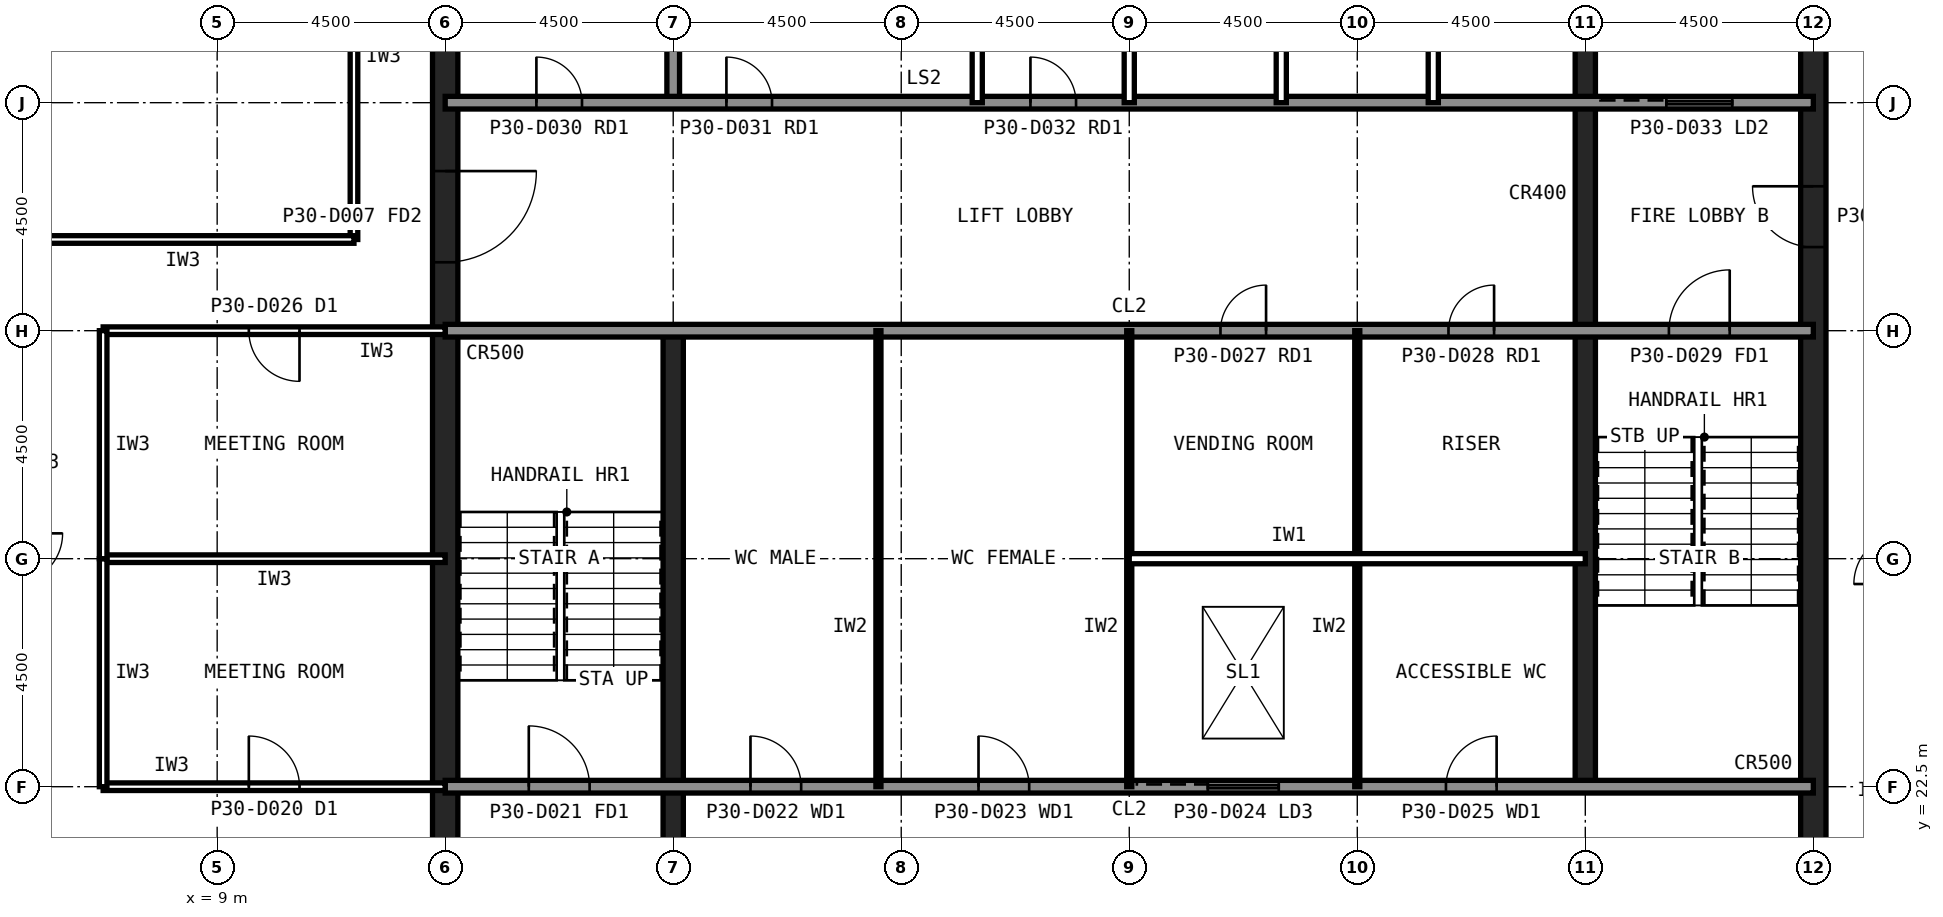
"""IFC4 building model, lengths in metres.
Left out: names, types, materials, properties, quantities, classifications, styles, units other than length and angle.
Written with IfcOpenShell. Run it as: python <this file> out.ifc"""

import sys

from ifc_helpers import new_model, si_unit, direction, frame, frame_2d, origin, place, context, subcontext, project, spatial, rectangle, extrude, element, fill, save


model = new_model("IFC4")
c1 = context("Model", 3, precision=1e-05, world=origin(), true_north=direction((0.0, 1.0)))
c2 = subcontext(c1, "Body", "Model", "MODEL_VIEW")
j1 = project(units=[si_unit("LENGTHUNIT", "METRE"), si_unit("PLANEANGLEUNIT", "RADIAN")], contexts=[c1])
p1 = place(None, origin())
s1 = spatial("IfcSite", under=j1, at=p1, CompositionType="ELEMENT")
p2 = place(p1, origin())
s2 = spatial("IfcBuilding", under=s1, at=p2, CompositionType="ELEMENT")
p3 = place(p2, frame((0.0, 0.0, 127.6)))
s3 = spatial("IfcBuildingStorey", under=s2, at=p3, CompositionType="ELEMENT", Elevation=127.6)
p4 = place(p3, frame((40.5, 13.5, 0.0), z_axis=(0.0, 0.0, 1.0), x_axis=(0.0, 1.0, 0.0)))
e1 = element("IfcWall", 1, at=p4, inside=s3, PredefinedType="SHEAR", context=c2, shape_type="SweptSolid", body=[
    extrude(rectangle(XDim=27.0, YDim=0.5, at=frame_2d((13.5, 0.0))), origin(), (0.0, 0.0, 1.0), 4.0),
])
p5 = place(p4, frame((5.85, 0.0, 0.0)))
e2 = element("IfcOpeningElement", 2, at=p5, cuts=e1, PredefinedType="OPENING", context=c2, shape_type="SweptSolid", body=[
    extrude(rectangle(XDim=1.8, YDim=2.1, at=frame_2d((0.9, 1.05))), frame((0.0, 0.26, 0.0), z_axis=(0.0, -1.0, 0.0), x_axis=(1.0, 0.0, 0.0)), (0.0, 0.0, 1.0), 0.52),
])
p6 = place(p4, frame((19.65, 0.0, 0.0)))
e3 = element("IfcOpeningElement", 3, at=p6, cuts=e1, PredefinedType="OPENING", context=c2, shape_type="SweptSolid", body=[
    extrude(rectangle(XDim=1.2, YDim=2.1, at=frame_2d((0.6, 1.05))), frame((0.0, 0.26, 0.0), z_axis=(0.0, -1.0, 0.0), x_axis=(1.0, 0.0, 0.0)), (0.0, 0.0, 1.0), 0.52),
])
p7 = place(p3, frame((13.5, 40.5, 0.0), z_axis=(0.0, 0.0, 1.0), x_axis=(0.0, -1.0, 0.0)))
e4 = element("IfcWall", 4, at=p7, inside=s3, PredefinedType="SHEAR", context=c2, shape_type="SweptSolid", body=[
    extrude(rectangle(XDim=27.0, YDim=0.5, at=frame_2d((13.5, 0.0))), origin(), (0.0, 0.0, 1.0), 4.0),
])
p8 = place(p7, frame((19.65, 0.0, 0.0)))
e5 = element("IfcOpeningElement", 5, at=p8, cuts=e4, PredefinedType="OPENING", context=c2, shape_type="SweptSolid", body=[
    extrude(rectangle(XDim=1.2, YDim=2.1, at=frame_2d((0.6, 1.05))), frame((0.0, 0.26, 0.0), z_axis=(0.0, -1.0, 0.0), x_axis=(1.0, 0.0, 0.0)), (0.0, 0.0, 1.0), 0.52),
])
p9 = place(p7, frame((5.85, 0.0, 0.0)))
e6 = element("IfcOpeningElement", 6, at=p9, cuts=e4, PredefinedType="OPENING", context=c2, shape_type="SweptSolid", body=[
    extrude(rectangle(XDim=1.8, YDim=2.1, at=frame_2d((0.9, 1.05))), frame((0.0, 0.26, 0.0), z_axis=(0.0, -1.0, 0.0), x_axis=(1.0, 0.0, 0.0)), (0.0, 0.0, 1.0), 0.52),
])
p10 = place(p3, frame((18.0, 13.5, 0.0), z_axis=(0.0, 0.0, 1.0), x_axis=(0.0, 1.0, 0.0)))
e7 = element("IfcWall", 7, at=p10, inside=s3, PredefinedType="SHEAR", context=c2, shape_type="SweptSolid", body=[
    extrude(rectangle(XDim=18.0, YDim=0.4, at=frame_2d((9.0, 0.0))), origin(), (0.0, 0.0, 1.0), 4.0),
])
p11 = place(p3, frame((18.0, 36.0, 0.0), z_axis=(0.0, 0.0, 1.0), x_axis=(0.0, 1.0, 0.0)))
e8 = element("IfcWall", 8, at=p11, inside=s3, PredefinedType="SOLIDWALL", context=c2, shape_type="SweptSolid", body=[
    extrude(rectangle(XDim=4.5, YDim=0.25, at=frame_2d((2.25, 0.0))), origin(), (0.0, 0.0, 1.0), 3.84),
])
p12 = place(p3, frame((36.0, 22.5, 0.0), z_axis=(0.0, 0.0, 1.0), x_axis=(0.0, 1.0, 0.0)))
e9 = element("IfcWall", 9, at=p12, inside=s3, PredefinedType="SHEAR", context=c2, shape_type="SweptSolid", body=[
    extrude(rectangle(XDim=18.0, YDim=0.4, at=frame_2d((9.0, 0.0))), origin(), (0.0, 0.0, 1.0), 4.0),
])
p13 = place(p3, frame((13.5, 36.0, 0.0), z_axis=(0.0, 0.0, 1.0), x_axis=(1.0, 0.0, 0.0)))
e10 = element("IfcWall", 10, at=p13, inside=s3, PredefinedType="SOLIDWALL", context=c2, shape_type="SweptSolid", body=[
    extrude(rectangle(XDim=27.0, YDim=0.25, at=frame_2d((13.5, 0.0))), origin(), (0.0, 0.0, 1.0), 3.84),
])
p14 = place(p13, frame((1.8, 0.0, 0.0)))
e11 = element("IfcOpeningElement", 11, at=p14, cuts=e10, PredefinedType="OPENING", context=c2, shape_type="SweptSolid", body=[
    extrude(rectangle(XDim=0.9, YDim=2.1, at=frame_2d((0.45, 1.05))), frame((0.0, 0.135, 0.0), z_axis=(0.0, -1.0, 0.0), x_axis=(1.0, 0.0, 0.0)), (0.0, 0.0, 1.0), 0.27),
])
p15 = place(p13, frame((5.55, 0.0, 0.0)))
e12 = element("IfcOpeningElement", 12, at=p15, cuts=e10, PredefinedType="OPENING", context=c2, shape_type="SweptSolid", body=[
    extrude(rectangle(XDim=0.9, YDim=2.1, at=frame_2d((0.45, 1.05))), frame((0.0, 0.135, 0.0), z_axis=(0.0, -1.0, 0.0), x_axis=(1.0, 0.0, 0.0)), (0.0, 0.0, 1.0), 0.27),
])
p16 = place(p13, frame((8.55, 0.0, 0.0)))
e13 = element("IfcOpeningElement", 13, at=p16, cuts=e10, PredefinedType="OPENING", context=c2, shape_type="SweptSolid", body=[
    extrude(rectangle(XDim=0.9, YDim=2.1, at=frame_2d((0.45, 1.05))), frame((0.0, 0.135, 0.0), z_axis=(0.0, -1.0, 0.0), x_axis=(1.0, 0.0, 0.0)), (0.0, 0.0, 1.0), 0.27),
])
p17 = place(p13, frame((11.55, 0.0, 0.0)))
e14 = element("IfcOpeningElement", 14, at=p17, cuts=e10, PredefinedType="OPENING", context=c2, shape_type="SweptSolid", body=[
    extrude(rectangle(XDim=0.9, YDim=2.1, at=frame_2d((0.45, 1.05))), frame((0.0, 0.135, 0.0), z_axis=(0.0, -1.0, 0.0), x_axis=(1.0, 0.0, 0.0)), (0.0, 0.0, 1.0), 0.27),
])
p18 = place(p13, frame((24.1, 0.0, 0.0)))
e15 = element("IfcOpeningElement", 15, at=p18, cuts=e10, PredefinedType="OPENING", context=c2, shape_type="SweptSolid", body=[
    extrude(rectangle(XDim=1.3, YDim=2.2, at=frame_2d((0.65, 1.1))), frame((0.0, 0.135, 0.0), z_axis=(0.0, -1.0, 0.0), x_axis=(1.0, 0.0, 0.0)), (0.0, 0.0, 1.0), 0.27),
])
p19 = place(p3, frame((13.5, 22.5, 0.0), z_axis=(0.0, 0.0, 1.0), x_axis=(1.0, 0.0, 0.0)))
e16 = element("IfcWall", 16, at=p19, inside=s3, PredefinedType="SOLIDWALL", context=c2, shape_type="SweptSolid", body=[
    extrude(rectangle(XDim=27.0, YDim=0.25, at=frame_2d((13.5, 0.0))), origin(), (0.0, 0.0, 1.0), 3.84),
])
p20 = place(p19, frame((1.65, 0.0, 0.0)))
e17 = element("IfcOpeningElement", 17, at=p20, cuts=e16, PredefinedType="OPENING", context=c2, shape_type="SweptSolid", body=[
    extrude(rectangle(XDim=1.2, YDim=2.1, at=frame_2d((0.6, 1.05))), frame((0.0, 0.135, 0.0), z_axis=(0.0, -1.0, 0.0), x_axis=(1.0, 0.0, 0.0)), (0.0, 0.0, 1.0), 0.27),
])
p21 = place(p19, frame((6.025, 0.0, 0.0)))
e18 = element("IfcOpeningElement", 18, at=p21, cuts=e16, PredefinedType="OPENING", context=c2, shape_type="SweptSolid", body=[
    extrude(rectangle(XDim=1.0, YDim=2.1, at=frame_2d((0.5, 1.05))), frame((0.0, 0.135, 0.0), z_axis=(0.0, -1.0, 0.0), x_axis=(1.0, 0.0, 0.0)), (0.0, 0.0, 1.0), 0.27),
])
p22 = place(p19, frame((10.525, 0.0, 0.0)))
e19 = element("IfcOpeningElement", 19, at=p22, cuts=e16, PredefinedType="OPENING", context=c2, shape_type="SweptSolid", body=[
    extrude(rectangle(XDim=1.0, YDim=2.1, at=frame_2d((0.5, 1.05))), frame((0.0, 0.135, 0.0), z_axis=(0.0, -1.0, 0.0), x_axis=(1.0, 0.0, 0.0)), (0.0, 0.0, 1.0), 0.27),
])
p23 = place(p19, frame((19.75, 0.0, 0.0)))
e20 = element("IfcOpeningElement", 20, at=p23, cuts=e16, PredefinedType="OPENING", context=c2, shape_type="SweptSolid", body=[
    extrude(rectangle(XDim=1.0, YDim=2.1, at=frame_2d((0.5, 1.05))), frame((0.0, 0.135, 0.0), z_axis=(0.0, -1.0, 0.0), x_axis=(1.0, 0.0, 0.0)), (0.0, 0.0, 1.0), 0.27),
])
p24 = place(p19, frame((15.05, 0.0, 0.0)))
e21 = element("IfcOpeningElement", 21, at=p24, cuts=e16, PredefinedType="OPENING", context=c2, shape_type="SweptSolid", body=[
    extrude(rectangle(XDim=1.4, YDim=2.4, at=frame_2d((0.7, 1.2))), frame((0.0, 0.135, 0.0), z_axis=(0.0, -1.0, 0.0), x_axis=(1.0, 0.0, 0.0)), (0.0, 0.0, 1.0), 0.27),
])
p25 = place(p3, frame((13.5, 31.5, 0.0), z_axis=(0.0, 0.0, 1.0), x_axis=(1.0, 0.0, 0.0)))
e22 = element("IfcWall", 22, at=p25, inside=s3, PredefinedType="SOLIDWALL", context=c2, shape_type="SweptSolid", body=[
    extrude(rectangle(XDim=27.0, YDim=0.25, at=frame_2d((13.5, 0.0))), origin(), (0.0, 0.0, 1.0), 3.84),
])
p26 = place(p25, frame((24.15, 0.0, 0.0)))
e23 = element("IfcOpeningElement", 23, at=p26, cuts=e22, PredefinedType="OPENING", context=c2, shape_type="SweptSolid", body=[
    extrude(rectangle(XDim=1.2, YDim=2.1, at=frame_2d((0.6, 1.05))), frame((0.0, 0.135, 0.0), z_axis=(0.0, -1.0, 0.0), x_axis=(1.0, 0.0, 0.0)), (0.0, 0.0, 1.0), 0.27),
])
p27 = place(p25, frame((15.3, 0.0, 0.0)))
e24 = element("IfcOpeningElement", 24, at=p27, cuts=e22, PredefinedType="OPENING", context=c2, shape_type="SweptSolid", body=[
    extrude(rectangle(XDim=0.9, YDim=2.1, at=frame_2d((0.45, 1.05))), frame((0.0, 0.135, 0.0), z_axis=(0.0, -1.0, 0.0), x_axis=(1.0, 0.0, 0.0)), (0.0, 0.0, 1.0), 0.27),
])
p28 = place(p25, frame((19.8, 0.0, 0.0)))
e25 = element("IfcOpeningElement", 25, at=p28, cuts=e22, PredefinedType="OPENING", context=c2, shape_type="SweptSolid", body=[
    extrude(rectangle(XDim=0.9, YDim=2.1, at=frame_2d((0.45, 1.05))), frame((0.0, 0.135, 0.0), z_axis=(0.0, -1.0, 0.0), x_axis=(1.0, 0.0, 0.0)), (0.0, 0.0, 1.0), 0.27),
])
for number, where, z_axis, x_axis in (
    (26, (21.0, 36.0, 0.0), (0.0, 0.0, 1.0), (0.0, 1.0, 0.0)),
    (27, (24.0, 36.0, 0.0), (0.0, 0.0, 1.0), (0.0, 1.0, 0.0)),
    (28, (27.0, 36.0, 0.0), (0.0, 0.0, 1.0), (0.0, 1.0, 0.0)),
    (29, (30.0, 36.0, 0.0), (0.0, 0.0, 1.0), (0.0, 1.0, 0.0)),
    (30, (33.0, 36.0, 0.0), (0.0, 0.0, 1.0), (0.0, 1.0, 0.0)),
):
    element("IfcWall", number, at=place(p3, frame(where, z_axis=z_axis, x_axis=x_axis)), inside=s3, PredefinedType="PARTITIONING", context=c2, shape_type="SweptSolid", body=[
        extrude(rectangle(XDim=4.5, YDim=0.2, at=frame_2d((2.25, 0.0))), origin(), (0.0, 0.0, 1.0), 3.84),
    ])
for number, where, z_axis, x_axis in (
    (31, (22.05, 22.5, 0.0), (0.0, 0.0, 1.0), (0.0, 1.0, 0.0)),
    (32, (27.0, 22.5, 0.0), (0.0, 0.0, 1.0), (0.0, 1.0, 0.0)),
    (33, (31.5, 22.5, 0.0), (0.0, 0.0, 1.0), (0.0, 1.0, 0.0)),
):
    element("IfcWall", number, at=place(p3, frame(where, z_axis=z_axis, x_axis=x_axis)), inside=s3, PredefinedType="PLUMBINGWALL", context=c2, shape_type="SweptSolid", body=[
        extrude(rectangle(XDim=9.0, YDim=0.1, at=frame_2d((4.5, 0.0))), origin(), (0.0, 0.0, 1.0), 3.84),
    ])
p29 = place(p3, frame((27.0, 27.0, 0.0), z_axis=(0.0, 0.0, 1.0), x_axis=(1.0, 0.0, 0.0)))
e34 = element("IfcWall", 34, at=p29, inside=s3, PredefinedType="PARTITIONING", context=c2, shape_type="SweptSolid", body=[
    extrude(rectangle(XDim=9.0, YDim=0.2, at=frame_2d((4.5, 0.0))), origin(), (0.0, 0.0, 1.0), 3.84),
])
p30 = place(p3, frame((11.7, 40.5, 0.0), z_axis=(0.0, 0.0, 1.0), x_axis=(0.0, -1.0, 0.0)))
e35 = element("IfcWall", 35, at=p30, inside=s3, PredefinedType="PARTITIONING", context=c2, shape_type="SweptSolid", body=[
    extrude(rectangle(XDim=7.2, YDim=0.15, at=frame_2d((3.6, 0.0))), origin(), (0.0, 0.0, 1.0), 3.84),
])
p31 = place(p3, frame((11.7, 33.3, 0.0), z_axis=(0.0, 0.0, 1.0), x_axis=(-1.0, 0.0, 0.0)))
e36 = element("IfcWall", 36, at=p31, inside=s3, PredefinedType="PARTITIONING", context=c2, shape_type="SweptSolid", body=[
    extrude(rectangle(XDim=6.75, YDim=0.15, at=frame_2d((3.375, 0.0))), origin(), (0.0, 0.0, 1.0), 3.84),
])
p32 = place(p3, frame((6.75, 22.5, 0.0), z_axis=(0.0, 0.0, 1.0), x_axis=(1.0, 0.0, 0.0)))
e37 = element("IfcWall", 37, at=p32, inside=s3, PredefinedType="PARTITIONING", context=c2, shape_type="SweptSolid", body=[
    extrude(rectangle(XDim=6.75, YDim=0.15, at=frame_2d((3.375, 0.0))), origin(), (0.0, 0.0, 1.0), 2.989),
])
p33 = place(p32, frame((2.875, 0.0, 0.0)))
e38 = element("IfcOpeningElement", 38, at=p33, cuts=e37, PredefinedType="OPENING", context=c2, shape_type="SweptSolid", body=[
    extrude(rectangle(XDim=1.0, YDim=2.1, at=frame_2d((0.5, 1.05))), frame((0.0, 0.085, 0.0), z_axis=(0.0, -1.0, 0.0), x_axis=(1.0, 0.0, 0.0)), (0.0, 0.0, 1.0), 0.17),
])
p34 = place(p3, frame((13.5, 27.0, 0.0), z_axis=(0.0, 0.0, 1.0), x_axis=(-1.0, 0.0, 0.0)))
e39 = element("IfcWall", 39, at=p34, inside=s3, PredefinedType="PARTITIONING", context=c2, shape_type="SweptSolid", body=[
    extrude(rectangle(XDim=6.75, YDim=0.15, at=frame_2d((3.375, 0.0))), origin(), (0.0, 0.0, 1.0), 2.989),
])
p35 = place(p3, frame((6.75, 27.0, 0.0), z_axis=(0.0, 0.0, 1.0), x_axis=(0.0, -1.0, 0.0)))
e40 = element("IfcWall", 40, at=p35, inside=s3, PredefinedType="PARTITIONING", context=c2, shape_type="SweptSolid", body=[
    extrude(rectangle(XDim=4.5, YDim=0.15, at=frame_2d((2.25, 0.0))), origin(), (0.0, 0.0, 1.0), 3.84),
])
p36 = place(p3, frame((13.5, 31.5, 0.0), z_axis=(0.0, 0.0, 1.0), x_axis=(-1.0, 0.0, 0.0)))
e41 = element("IfcWall", 41, at=p36, inside=s3, PredefinedType="PARTITIONING", context=c2, shape_type="SweptSolid", body=[
    extrude(rectangle(XDim=6.75, YDim=0.15, at=frame_2d((3.375, 0.0))), origin(), (0.0, 0.0, 1.0), 2.989),
])
p37 = place(p36, frame((2.875, 0.0, 0.0)))
e42 = element("IfcOpeningElement", 42, at=p37, cuts=e41, PredefinedType="OPENING", context=c2, shape_type="SweptSolid", body=[
    extrude(rectangle(XDim=1.0, YDim=2.1, at=frame_2d((0.5, 1.05))), frame((0.0, 0.085, 0.0), z_axis=(0.0, -1.0, 0.0), x_axis=(1.0, 0.0, 0.0)), (0.0, 0.0, 1.0), 0.17),
])
p38 = place(p3, frame((6.75, 31.5, 0.0), z_axis=(0.0, 0.0, 1.0), x_axis=(0.0, -1.0, 0.0)))
e43 = element("IfcWall", 43, at=p38, inside=s3, PredefinedType="PARTITIONING", context=c2, shape_type="SweptSolid", body=[
    extrude(rectangle(XDim=4.5, YDim=0.15, at=frame_2d((2.25, 0.0))), origin(), (0.0, 0.0, 1.0), 3.84),
])
p39 = place(p9, origin())
e44 = element("IfcDoor", 44, at=p39, inside=s3, OperationType="SINGLE_SWING_LEFT", PredefinedType="DOOR", context=c2, shape_type="SweptSolid", body=[
    extrude(rectangle(XDim=1.8, YDim=2.1, at=frame_2d((0.9, 1.05))), frame((0.0, 0.025, 0.0), z_axis=(0.0, -1.0, 0.0), x_axis=(1.0, 0.0, 0.0)), (0.0, 0.0, 1.0), 0.05),
])
fill(e6, e44)
p40 = place(p6, origin())
e45 = element("IfcDoor", 45, at=p40, inside=s3, OperationType="SINGLE_SWING_RIGHT", PredefinedType="DOOR", context=c2, shape_type="SweptSolid", body=[
    extrude(rectangle(XDim=1.2, YDim=2.1, at=frame_2d((0.6, 1.05))), frame((0.0, 0.025, 0.0), z_axis=(0.0, -1.0, 0.0), x_axis=(1.0, 0.0, 0.0)), (0.0, 0.0, 1.0), 0.05),
])
fill(e3, e45)
p41 = place(p20, origin())
e46 = element("IfcDoor", 46, at=p41, inside=s3, OperationType="SINGLE_SWING_LEFT", PredefinedType="DOOR", context=c2, shape_type="SweptSolid", body=[
    extrude(rectangle(XDim=1.2, YDim=2.1, at=frame_2d((0.6, 1.05))), frame((0.0, 0.025, 0.0), z_axis=(0.0, -1.0, 0.0), x_axis=(1.0, 0.0, 0.0)), (0.0, 0.0, 1.0), 0.05),
])
fill(e17, e46)
p42 = place(p26, origin())
e47 = element("IfcDoor", 47, at=p42, inside=s3, OperationType="SINGLE_SWING_RIGHT", PredefinedType="DOOR", context=c2, shape_type="SweptSolid", body=[
    extrude(rectangle(XDim=1.2, YDim=2.1, at=frame_2d((0.6, 1.05))), frame((0.0, 0.025, 0.0), z_axis=(0.0, -1.0, 0.0), x_axis=(1.0, 0.0, 0.0)), (0.0, 0.0, 1.0), 0.05),
])
fill(e23, e47)
p43 = place(p21, origin())
e48 = element("IfcDoor", 48, at=p43, inside=s3, OperationType="SINGLE_SWING_LEFT", PredefinedType="DOOR", context=c2, shape_type="SweptSolid", body=[
    extrude(rectangle(XDim=1.0, YDim=2.1, at=frame_2d((0.5, 1.05))), frame((0.0, 0.025, 0.0), z_axis=(0.0, -1.0, 0.0), x_axis=(1.0, 0.0, 0.0)), (0.0, 0.0, 1.0), 0.05),
])
fill(e18, e48)
p44 = place(p22, origin())
e49 = element("IfcDoor", 49, at=p44, inside=s3, OperationType="SINGLE_SWING_LEFT", PredefinedType="DOOR", context=c2, shape_type="SweptSolid", body=[
    extrude(rectangle(XDim=1.0, YDim=2.1, at=frame_2d((0.5, 1.05))), frame((0.0, 0.025, 0.0), z_axis=(0.0, -1.0, 0.0), x_axis=(1.0, 0.0, 0.0)), (0.0, 0.0, 1.0), 0.05),
])
fill(e19, e49)
p45 = place(p23, origin())
e50 = element("IfcDoor", 50, at=p45, inside=s3, OperationType="SINGLE_SWING_RIGHT", PredefinedType="DOOR", context=c2, shape_type="SweptSolid", body=[
    extrude(rectangle(XDim=1.0, YDim=2.1, at=frame_2d((0.5, 1.05))), frame((0.0, 0.025, 0.0), z_axis=(0.0, -1.0, 0.0), x_axis=(1.0, 0.0, 0.0)), (0.0, 0.0, 1.0), 0.05),
])
fill(e20, e50)
p46 = place(p27, origin())
e51 = element("IfcDoor", 51, at=p46, inside=s3, OperationType="SINGLE_SWING_RIGHT", PredefinedType="DOOR", context=c2, shape_type="SweptSolid", body=[
    extrude(rectangle(XDim=0.9, YDim=2.1, at=frame_2d((0.45, 1.05))), frame((0.0, 0.025, 0.0), z_axis=(0.0, -1.0, 0.0), x_axis=(1.0, 0.0, 0.0)), (0.0, 0.0, 1.0), 0.05),
])
fill(e24, e51)
p47 = place(p28, origin())
e52 = element("IfcDoor", 52, at=p47, inside=s3, OperationType="SINGLE_SWING_RIGHT", PredefinedType="DOOR", context=c2, shape_type="SweptSolid", body=[
    extrude(rectangle(XDim=0.9, YDim=2.1, at=frame_2d((0.45, 1.05))), frame((0.0, 0.025, 0.0), z_axis=(0.0, -1.0, 0.0), x_axis=(1.0, 0.0, 0.0)), (0.0, 0.0, 1.0), 0.05),
])
fill(e25, e52)
p48 = place(p14, origin())
e53 = element("IfcDoor", 53, at=p48, inside=s3, OperationType="SINGLE_SWING_LEFT", PredefinedType="DOOR", context=c2, shape_type="SweptSolid", body=[
    extrude(rectangle(XDim=0.9, YDim=2.1, at=frame_2d((0.45, 1.05))), frame((0.0, 0.025, 0.0), z_axis=(0.0, -1.0, 0.0), x_axis=(1.0, 0.0, 0.0)), (0.0, 0.0, 1.0), 0.05),
])
fill(e11, e53)
p49 = place(p15, origin())
e54 = element("IfcDoor", 54, at=p49, inside=s3, OperationType="SINGLE_SWING_LEFT", PredefinedType="DOOR", context=c2, shape_type="SweptSolid", body=[
    extrude(rectangle(XDim=0.9, YDim=2.1, at=frame_2d((0.45, 1.05))), frame((0.0, 0.025, 0.0), z_axis=(0.0, -1.0, 0.0), x_axis=(1.0, 0.0, 0.0)), (0.0, 0.0, 1.0), 0.05),
])
fill(e12, e54)
p50 = place(p16, origin())
e55 = element("IfcDoor", 55, at=p50, inside=s3, OperationType="SINGLE_SWING_LEFT", PredefinedType="DOOR", context=c2, shape_type="SweptSolid", body=[
    extrude(rectangle(XDim=0.9, YDim=2.1, at=frame_2d((0.45, 1.05))), frame((0.0, 0.025, 0.0), z_axis=(0.0, -1.0, 0.0), x_axis=(1.0, 0.0, 0.0)), (0.0, 0.0, 1.0), 0.05),
])
fill(e13, e55)
p51 = place(p17, origin())
e56 = element("IfcDoor", 56, at=p51, inside=s3, OperationType="SINGLE_SWING_LEFT", PredefinedType="DOOR", context=c2, shape_type="SweptSolid", body=[
    extrude(rectangle(XDim=0.9, YDim=2.1, at=frame_2d((0.45, 1.05))), frame((0.0, 0.025, 0.0), z_axis=(0.0, -1.0, 0.0), x_axis=(1.0, 0.0, 0.0)), (0.0, 0.0, 1.0), 0.05),
])
fill(e14, e56)
p52 = place(p18, origin())
e57 = element("IfcDoor", 57, at=p52, inside=s3, OperationType="SLIDING_TO_LEFT", PredefinedType="DOOR", context=c2, shape_type="SweptSolid", body=[
    extrude(rectangle(XDim=1.3, YDim=2.2, at=frame_2d((0.65, 1.1))), frame((0.0, 0.025, 0.0), z_axis=(0.0, -1.0, 0.0), x_axis=(1.0, 0.0, 0.0)), (0.0, 0.0, 1.0), 0.05),
])
fill(e15, e57)
p53 = place(p24, origin())
e58 = element("IfcDoor", 58, at=p53, inside=s3, OperationType="SLIDING_TO_LEFT", PredefinedType="DOOR", context=c2, shape_type="SweptSolid", body=[
    extrude(rectangle(XDim=1.4, YDim=2.4, at=frame_2d((0.7, 1.2))), frame((0.0, 0.025, 0.0), z_axis=(0.0, -1.0, 0.0), x_axis=(1.0, 0.0, 0.0)), (0.0, 0.0, 1.0), 0.05),
])
fill(e21, e58)
p54 = place(p33, origin())
e59 = element("IfcDoor", 59, at=p54, inside=s3, OperationType="SINGLE_SWING_LEFT", PredefinedType="DOOR", context=c2, shape_type="SweptSolid", body=[
    extrude(rectangle(XDim=1.0, YDim=2.1, at=frame_2d((0.5, 1.05))), frame((0.0, 0.025, 0.0), z_axis=(0.0, -1.0, 0.0), x_axis=(1.0, 0.0, 0.0)), (0.0, 0.0, 1.0), 0.05),
])
fill(e38, e59)
p55 = place(p37, origin())
e60 = element("IfcDoor", 60, at=p55, inside=s3, OperationType="SINGLE_SWING_LEFT", PredefinedType="DOOR", context=c2, shape_type="SweptSolid", body=[
    extrude(rectangle(XDim=1.0, YDim=2.1, at=frame_2d((0.5, 1.05))), frame((0.0, 0.025, 0.0), z_axis=(0.0, -1.0, 0.0), x_axis=(1.0, 0.0, 0.0)), (0.0, 0.0, 1.0), 0.05),
])
fill(e42, e60)
save(model, sys.argv[1])
